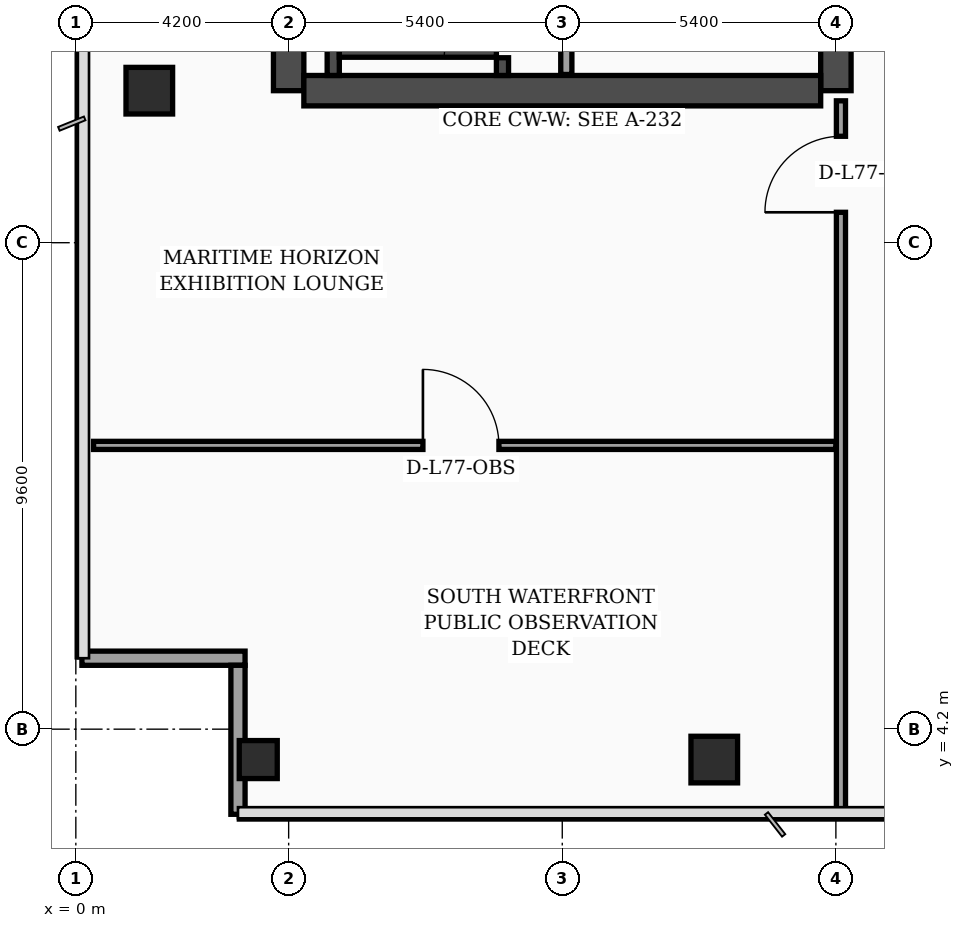
"""IFC4 building model, lengths in metres.
Left out: names, types, materials, properties, quantities, classifications, styles, units other than length and angle.
Written with IfcOpenShell. Run it as: python <this file> out.ifc"""

import sys

from ifc_helpers import new_model, si_unit, direction, frame, frame_2d, origin, origin_2d, place, context, subcontext, project, spatial, rectangle, hollow_rectangle, extrude, element, fill, save


model = new_model("IFC4")
c1 = context("Model", 3, precision=1e-05, world=origin(), true_north=direction((0.0, 1.0)))
c2 = subcontext(c1, "Body", "Model", "MODEL_VIEW")
j1 = project(units=[si_unit("LENGTHUNIT", "METRE"), si_unit("PLANEANGLEUNIT", "RADIAN")], contexts=[c1])
p1 = place(None, origin())
s1 = spatial("IfcSite", under=j1, at=p1, CompositionType="ELEMENT")
p2 = place(p1, origin())
s2 = spatial("IfcBuilding", under=s1, at=p2, CompositionType="ELEMENT")
p3 = place(p2, frame((0.0, 0.0, 311.5)))
s3 = spatial("IfcBuildingStorey", under=s2, at=p3, CompositionType="ELEMENT", Elevation=311.5)
p4 = place(p3, frame((4.2, 16.8, 0.0), z_axis=(0.0, 0.0, 1.0), x_axis=(0.0, 1.0, 0.0)))
e1 = element("IfcWall", 1, at=p4, inside=s3, PredefinedType="SHEAR", context=c2, shape_type="SweptSolid", body=[
    extrude(rectangle(XDim=21.6, YDim=0.6, at=frame_2d((10.8, 0.0))), origin(), (0.0, 0.0, 1.0), 4.26),
])
p5 = place(p3, frame((15.0, 16.8, 0.0), z_axis=(0.0, 0.0, 1.0), x_axis=(0.0, 1.0, 0.0)))
e2 = element("IfcWall", 2, at=p5, inside=s3, PredefinedType="SHEAR", context=c2, shape_type="SweptSolid", body=[
    extrude(rectangle(XDim=21.6, YDim=0.6, at=frame_2d((10.8, 0.0))), origin(), (0.0, 0.0, 1.0), 4.26),
])
p6 = place(p5, frame((8.65, 0.0, 0.0)))
e3 = element("IfcOpeningElement", 3, at=p6, cuts=e2, PredefinedType="OPENING", context=c2, shape_type="SweptSolid", body=[
    extrude(rectangle(XDim=1.1, YDim=2.2, at=frame_2d((0.55, 1.1))), frame((0.0, 0.31, 0.0), z_axis=(0.0, -1.0, 0.0), x_axis=(1.0, 0.0, 0.0)), (0.0, 0.0, 1.0), 0.62),
])
p7 = place(p5, frame((18.9, 0.0, 0.0)))
e4 = element("IfcOpeningElement", 4, at=p7, cuts=e2, PredefinedType="OPENING", context=c2, shape_type="SweptSolid", body=[
    extrude(rectangle(XDim=1.1, YDim=2.2, at=frame_2d((0.55, 1.1))), frame((0.0, 0.31, 0.0), z_axis=(0.0, -1.0, 0.0), x_axis=(1.0, 0.0, 0.0)), (0.0, 0.0, 1.0), 0.62),
])
p8 = place(p3, frame((4.5, 16.8, 0.0), z_axis=(0.0, 0.0, 1.0), x_axis=(1.0, 0.0, 0.0)))
e5 = element("IfcWall", 5, at=p8, inside=s3, PredefinedType="SHEAR", context=c2, shape_type="SweptSolid", body=[
    extrude(rectangle(XDim=10.2, YDim=0.6, at=frame_2d((5.1, 0.0))), origin(), (0.0, 0.0, 1.0), 4.26),
])
p9 = place(p3, frame((5.08, 17.1, 0.0), z_axis=(0.0, 0.0, 1.0), x_axis=(0.0, 1.0, 0.0)))
e6 = element("IfcWall", 6, at=p9, inside=s3, PredefinedType="SOLIDWALL", context=c2, shape_type="SweptSolid", body=[
    extrude(rectangle(XDim=9.69, YDim=0.24, at=frame_2d((4.845, 0.0))), origin(), (0.0, 0.0, 1.0), 4.26),
])
p10 = place(p3, frame((8.42, 17.1, 0.0), z_axis=(0.0, 0.0, 1.0), x_axis=(0.0, 1.0, 0.0)))
e7 = element("IfcWall", 7, at=p10, inside=s3, PredefinedType="SOLIDWALL", context=c2, shape_type="SweptSolid", body=[
    extrude(rectangle(XDim=9.69, YDim=0.24, at=frame_2d((4.845, 0.0))), origin(), (0.0, 0.0, 1.0), 4.26),
])
p11 = place(p10, frame((0.35, 0.0, 0.0)))
e8 = element("IfcOpeningElement", 8, at=p11, cuts=e7, PredefinedType="OPENING", context=c2, shape_type="SweptSolid", body=[
    extrude(rectangle(XDim=1.15, YDim=2.2, at=frame_2d((0.575, 1.1))), frame((0.0, 0.13, 0.0), z_axis=(0.0, -1.0, 0.0), x_axis=(1.0, 0.0, 0.0)), (0.0, 0.0, 1.0), 0.26),
])
p12 = place(p3, frame((5.2, 17.58, 0.0), z_axis=(0.0, 0.0, 1.0), x_axis=(1.0, 0.0, 0.0)))
e9 = element("IfcWall", 9, at=p12, inside=s3, PredefinedType="SOLIDWALL", context=c2, shape_type="SweptSolid", body=[
    extrude(rectangle(XDim=3.1, YDim=0.24, at=frame_2d((1.55, 0.0))), origin(), (0.0, 0.0, 1.0), 4.26),
])
p13 = place(p3, frame((3.6, 3.6, 0.0), z_axis=(0.0, 0.0, 1.0), x_axis=(1.0, 0.0, 0.0)))
e10 = element("IfcColumn", 10, at=p13, inside=s3, PredefinedType="COLUMN", context=c2, shape_type="SweptSolid", body=[
    extrude(hollow_rectangle(XDim=0.75, YDim=0.75, WallThickness=0.032, at=origin_2d()), origin(), (0.0, 0.0, 1.0), 4.26),
])
for number, where, z_axis, x_axis in (
    (11, (1.45, 16.8, 0.0), (0.0, 0.0, 1.0), (1.0, 0.0, 0.0)),
    (12, (12.6, 3.6, 0.0), (0.0, 0.0, 1.0), (1.0, 0.0, 0.0)),
):
    element("IfcColumn", number, at=place(p3, frame(where, z_axis=z_axis, x_axis=x_axis)), inside=s3, PredefinedType="COLUMN", context=c2, shape_type="SweptSolid", body=[
        extrude(rectangle(XDim=0.92, YDim=0.92, at=origin_2d()), origin(), (0.0, 0.0, 1.0), 4.26),
    ])
p14 = place(p3, frame((0.12, 5.6, 0.0), z_axis=(0.0, 0.0, 1.0), x_axis=(1.0, 0.0, 0.0)))
e13 = element("IfcWall", 13, at=p14, inside=s3, PredefinedType="SOLIDWALL", context=c2, shape_type="SweptSolid", body=[
    extrude(rectangle(XDim=3.22, YDim=0.28, at=frame_2d((1.61, 0.0))), origin(), (0.0, 0.0, 1.0), 3.69),
])
p15 = place(p3, frame((3.2, 5.46, 0.0), z_axis=(0.0, 0.0, 1.0), x_axis=(0.0, -1.0, 0.0)))
e14 = element("IfcWall", 14, at=p15, inside=s3, PredefinedType="SOLIDWALL", context=c2, shape_type="SweptSolid", body=[
    extrude(rectangle(XDim=2.94, YDim=0.28, at=frame_2d((1.47, 0.0))), origin(), (0.0, 0.0, 1.0), 3.69),
])
p16 = place(p3, frame((9.68, 17.12, 0.0), z_axis=(0.0, 0.0, 1.0), x_axis=(0.0, 1.0, 0.0)))
e15 = element("IfcWall", 15, at=p16, inside=s3, PredefinedType="SOLIDWALL", context=c2, shape_type="SweptSolid", body=[
    extrude(rectangle(XDim=7.88, YDim=0.22, at=frame_2d((3.94, 0.0))), origin(), (0.0, 0.0, 1.0), 4.26),
])
p17 = place(p3, frame((0.35, 9.8, 0.0), z_axis=(0.0, 0.0, 1.0), x_axis=(1.0, 0.0, 0.0)))
e16 = element("IfcWall", 16, at=p17, inside=s3, PredefinedType="PARTITIONING", context=c2, shape_type="SweptSolid", body=[
    extrude(rectangle(XDim=14.65, YDim=0.16, at=frame_2d((7.325, 0.0))), origin(), (0.0, 0.0, 1.0), 3.69),
])
p18 = place(p17, frame((6.5, 0.0, 0.0)))
e17 = element("IfcOpeningElement", 17, at=p18, cuts=e16, PredefinedType="OPENING", context=c2, shape_type="SweptSolid", body=[
    extrude(rectangle(XDim=1.5, YDim=2.22, at=frame_2d((0.75, 1.11))), frame((0.0, 0.09, 0.0), z_axis=(0.0, -1.0, 0.0), x_axis=(1.0, 0.0, 0.0)), (0.0, 0.0, 1.0), 0.18),
])
p19 = place(p3, frame((15.1, 2.6, 0.0), z_axis=(0.0, 0.0, 1.0), x_axis=(0.0, 1.0, 0.0)))
e18 = element("IfcWall", 18, at=p19, inside=s3, PredefinedType="PARTITIONING", context=c2, shape_type="SweptSolid", body=[
    extrude(rectangle(XDim=14.0, YDim=0.18, at=frame_2d((7.0, 0.0))), origin(), (0.0, 0.0, 1.0), 3.29),
])
p20 = place(p19, frame((11.8, 0.0, 0.0)))
e19 = element("IfcOpeningElement", 19, at=p20, cuts=e18, PredefinedType="OPENING", context=c2, shape_type="SweptSolid", body=[
    extrude(rectangle(XDim=1.5, YDim=2.22, at=frame_2d((0.75, 1.11))), frame((0.0, 0.1, 0.0), z_axis=(0.0, -1.0, 0.0), x_axis=(1.0, 0.0, 0.0)), (0.0, 0.0, 1.0), 0.2),
])
p21 = place(p18, origin())
e20 = element("IfcDoor", 20, at=p21, inside=s3, OperationType="SINGLE_SWING_LEFT", PredefinedType="DOOR", context=c2, shape_type="SweptSolid", body=[
    extrude(rectangle(XDim=1.5, YDim=2.22, at=frame_2d((0.75, 1.11))), frame((0.0, 0.025, 0.0), z_axis=(0.0, -1.0, 0.0), x_axis=(1.0, 0.0, 0.0)), (0.0, 0.0, 1.0), 0.05),
])
fill(e17, e20)
p22 = place(p20, origin())
e21 = element("IfcDoor", 21, at=p22, inside=s3, OperationType="SINGLE_SWING_LEFT", PredefinedType="DOOR", context=c2, shape_type="SweptSolid", body=[
    extrude(rectangle(XDim=1.5, YDim=2.22, at=frame_2d((0.75, 1.11))), frame((0.0, 0.025, 0.0), z_axis=(0.0, -1.0, 0.0), x_axis=(1.0, 0.0, 0.0)), (0.0, 0.0, 1.0), 0.05),
])
fill(e19, e21)
p23 = place(p11, origin())
e22 = element("IfcDoor", 22, at=p23, inside=s3, OperationType="SINGLE_SWING_LEFT", PredefinedType="DOOR", context=c2, shape_type="SweptSolid", body=[
    extrude(rectangle(XDim=1.15, YDim=2.2, at=frame_2d((0.575, 1.1))), frame((0.0, 0.025, 0.0), z_axis=(0.0, -1.0, 0.0), x_axis=(1.0, 0.0, 0.0)), (0.0, 0.0, 1.0), 0.05),
])
fill(e8, e22)
save(model, sys.argv[1])
